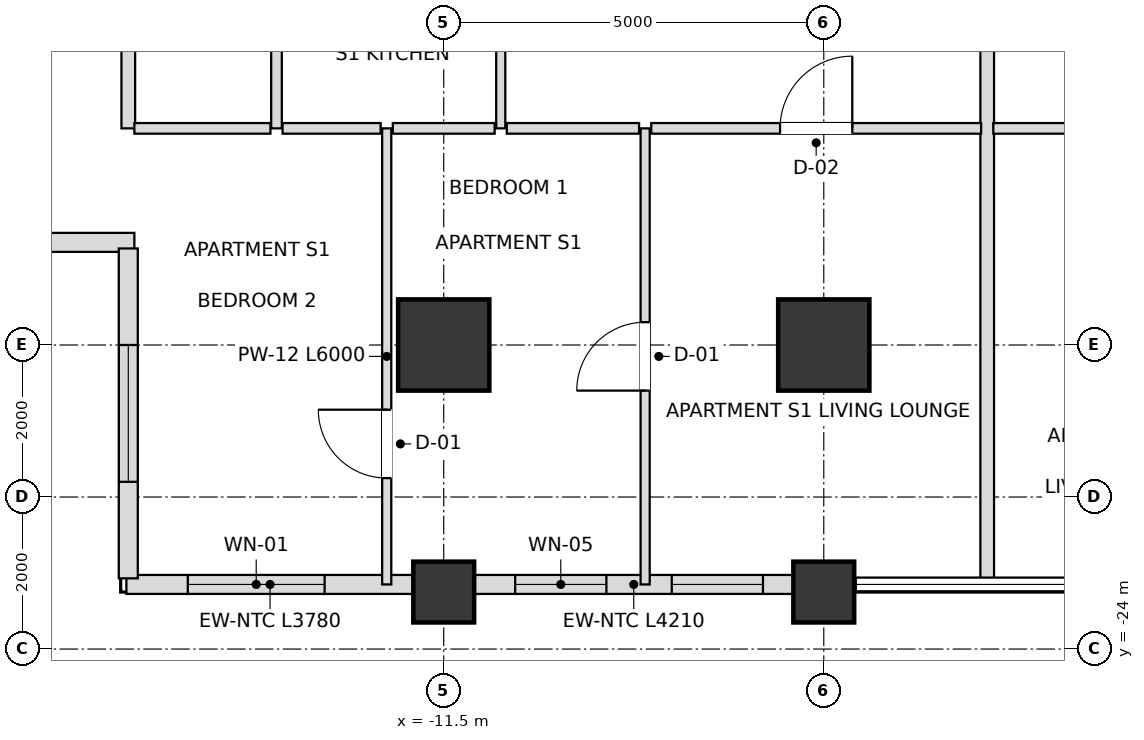
"""IFC4 building model, lengths in metres.
Left out: names, types, materials, properties, quantities, classifications, styles, units other than length and angle.
Written with IfcOpenShell. Run it as: python <this file> out.ifc"""

import sys

from ifc_helpers import new_model, si_unit, direction, frame, frame_2d, origin, origin_2d, place, context, subcontext, project, spatial, rectangle, extrude, element, fill, save


model = new_model("IFC4")
c1 = context("Model", 3, precision=1e-05, world=origin(), true_north=direction((0.0, 1.0)))
c2 = subcontext(c1, "Body", "Model", "MODEL_VIEW")
j1 = project(units=[si_unit("LENGTHUNIT", "METRE"), si_unit("PLANEANGLEUNIT", "RADIAN")], contexts=[c1])
p1 = place(None, origin())
s1 = spatial("IfcSite", under=j1, at=p1, CompositionType="ELEMENT")
p2 = place(p1, origin())
s2 = spatial("IfcBuilding", under=s1, at=p2, CompositionType="ELEMENT")
p3 = place(p2, frame((0.0, 0.0, 102.6)))
s3 = spatial("IfcBuildingStorey", under=s2, at=p3, CompositionType="ELEMENT", Elevation=102.6)
for number, where, z_axis, x_axis in (
    (1, (-11.5, -20.0, 0.0), (0.0, 0.0, 1.0), (1.0, 0.0, 0.0)),
    (2, (-6.5, -20.0, 0.0), (0.0, 0.0, 1.0), (1.0, 0.0, 0.0)),
):
    element("IfcColumn", number, at=place(p3, frame(where, z_axis=z_axis, x_axis=x_axis)), inside=s3, PredefinedType="USERDEFINED", context=c2, shape_type="SweptSolid", body=[
        extrude(rectangle(XDim=1.2, YDim=1.2, at=origin_2d()), origin(), (0.0, 0.0, 1.0), 3.6),
    ])
for number, where, z_axis, x_axis in (
    (3, (-11.5, -23.25, 0.0), (0.0, 0.0, 1.0), (1.0, 0.0, 0.0)),
    (4, (-6.5, -23.25, 0.0), (0.0, 0.0, 1.0), (1.0, 0.0, 0.0)),
):
    element("IfcColumn", number, at=place(p3, frame(where, z_axis=z_axis, x_axis=x_axis)), inside=s3, PredefinedType="COLUMN", context=c2, shape_type="SweptSolid", body=[
        extrude(rectangle(XDim=0.8, YDim=0.8, at=origin_2d()), origin(), (0.0, 0.0, 1.0), 3.6),
    ])
p4 = place(p3, frame((-15.675, -23.15, 0.0), z_axis=(0.0, 0.0, 1.0), x_axis=(1.0, 0.0, 0.0)))
e5 = element("IfcWall", 5, at=p4, inside=s3, PredefinedType="SOLIDWALL", context=c2, shape_type="SweptSolid", body=[
    extrude(rectangle(XDim=3.78, YDim=0.25, at=frame_2d((1.89, 0.0))), origin(), (0.0, 0.0, 1.0), 2.736),
])
p5 = place(p4, frame((0.808, 0.0, 0.72)))
e6 = element("IfcOpeningElement", 6, at=p5, cuts=e5, PredefinedType="OPENING", context=c2, shape_type="SweptSolid", body=[
    extrude(rectangle(XDim=1.8, YDim=1.68, at=frame_2d((0.9, 0.84))), frame((0.0, 0.135, 0.0), z_axis=(0.0, -1.0, 0.0), x_axis=(1.0, 0.0, 0.0)), (0.0, 0.0, 1.0), 0.27),
])
p6 = place(p3, frame((-11.105, -23.15, 0.0), z_axis=(0.0, 0.0, 1.0), x_axis=(1.0, 0.0, 0.0)))
e7 = element("IfcWall", 7, at=p6, inside=s3, PredefinedType="SOLIDWALL", context=c2, shape_type="SweptSolid", body=[
    extrude(rectangle(XDim=4.21, YDim=0.25, at=frame_2d((2.105, 0.0))), origin(), (0.0, 0.0, 1.0), 2.736),
])
p7 = place(p6, frame((0.545, 0.0, 0.72)))
e8 = element("IfcOpeningElement", 8, at=p7, cuts=e7, PredefinedType="OPENING", context=c2, shape_type="SweptSolid", body=[
    extrude(rectangle(XDim=1.2, YDim=1.68, at=frame_2d((0.6, 0.84))), frame((0.0, 0.135, 0.0), z_axis=(0.0, -1.0, 0.0), x_axis=(1.0, 0.0, 0.0)), (0.0, 0.0, 1.0), 0.27),
])
p8 = place(p6, frame((2.605, 0.0, 0.72)))
e9 = element("IfcOpeningElement", 9, at=p8, cuts=e7, PredefinedType="OPENING", context=c2, shape_type="SweptSolid", body=[
    extrude(rectangle(XDim=1.2, YDim=1.68, at=frame_2d((0.6, 0.84))), frame((0.0, 0.135, 0.0), z_axis=(0.0, -1.0, 0.0), x_axis=(1.0, 0.0, 0.0)), (0.0, 0.0, 1.0), 0.27),
])
p9 = place(p3, frame((-20.23, -18.65, 0.0), z_axis=(0.0, 0.0, 1.0), x_axis=(1.0, 0.0, 0.0)))
e10 = element("IfcWall", 10, at=p9, inside=s3, PredefinedType="SOLIDWALL", context=c2, shape_type="SweptSolid", body=[
    extrude(rectangle(XDim=4.66, YDim=0.25, at=frame_2d((2.33, 0.0))), origin(), (0.0, 0.0, 1.0), 2.736),
])
p10 = place(p9, frame((1.43, 0.0, 0.72)))
e11 = element("IfcOpeningElement", 11, at=p10, cuts=e10, PredefinedType="OPENING", context=c2, shape_type="SweptSolid", body=[
    extrude(rectangle(XDim=1.8, YDim=1.68, at=frame_2d((0.9, 0.84))), frame((0.0, 0.135, 0.0), z_axis=(0.0, -1.0, 0.0), x_axis=(1.0, 0.0, 0.0)), (0.0, 0.0, 1.0), 0.27),
])
p11 = place(p3, frame((-15.65, -18.73, 0.0), z_axis=(0.0, 0.0, 1.0), x_axis=(0.0, -1.0, 0.0)))
e12 = element("IfcWall", 12, at=p11, inside=s3, PredefinedType="SOLIDWALL", context=c2, shape_type="SweptSolid", body=[
    extrude(rectangle(XDim=4.34, YDim=0.25, at=frame_2d((2.17, 0.0))), origin(), (0.0, 0.0, 1.0), 2.736),
])
p12 = place(p11, frame((1.27, 0.0, 0.72)))
e13 = element("IfcOpeningElement", 13, at=p12, cuts=e12, PredefinedType="OPENING", context=c2, shape_type="SweptSolid", body=[
    extrude(rectangle(XDim=1.8, YDim=1.68, at=frame_2d((0.9, 0.84))), frame((0.0, 0.135, 0.0), z_axis=(0.0, -1.0, 0.0), x_axis=(1.0, 0.0, 0.0)), (0.0, 0.0, 1.0), 0.27),
])
p13 = place(p3, frame((-15.65, -17.15, 0.0), z_axis=(0.0, 0.0, 1.0), x_axis=(0.0, 1.0, 0.0)))
e14 = element("IfcWall", 14, at=p13, inside=s3, PredefinedType="PARTITIONING", context=c2, shape_type="SweptSolid", body=[
    extrude(rectangle(XDim=7.85, YDim=0.18, at=frame_2d((3.925, 0.0))), origin(), (0.0, 0.0, 1.0), 2.736),
])
p14 = place(p3, frame((-13.7, -17.15, 0.0), z_axis=(0.0, 0.0, 1.0), x_axis=(0.0, 1.0, 0.0)))
e15 = element("IfcWall", 15, at=p14, inside=s3, PredefinedType="PARTITIONING", context=c2, shape_type="SweptSolid", body=[
    extrude(rectangle(XDim=7.85, YDim=0.14, at=frame_2d((3.925, 0.0))), origin(), (0.0, 0.0, 1.0), 2.736),
])
p15 = place(p14, frame((3.48, 0.0, 0.0)))
e16 = element("IfcOpeningElement", 16, at=p15, cuts=e15, PredefinedType="OPENING", context=c2, shape_type="SweptSolid", body=[
    extrude(rectangle(XDim=0.9, YDim=2.1, at=frame_2d((0.45, 1.05))), frame((0.0, 0.08, 0.0), z_axis=(0.0, -1.0, 0.0), x_axis=(1.0, 0.0, 0.0)), (0.0, 0.0, 1.0), 0.16),
])
p16 = place(p3, frame((-12.25, -23.15, 0.0), z_axis=(0.0, 0.0, 1.0), x_axis=(0.0, 1.0, 0.0)))
e17 = element("IfcWall", 17, at=p16, inside=s3, PredefinedType="PARTITIONING", context=c2, shape_type="SweptSolid", body=[
    extrude(rectangle(XDim=6.0, YDim=0.12, at=frame_2d((3.0, 0.0))), origin(), (0.0, 0.0, 1.0), 2.736),
])
p17 = place(p16, frame((1.399, 0.0, 0.0)))
e18 = element("IfcOpeningElement", 18, at=p17, cuts=e17, PredefinedType="OPENING", context=c2, shape_type="SweptSolid", body=[
    extrude(rectangle(XDim=0.9, YDim=2.1, at=frame_2d((0.45, 1.05))), frame((0.0, 0.07, 0.0), z_axis=(0.0, -1.0, 0.0), x_axis=(1.0, 0.0, 0.0)), (0.0, 0.0, 1.0), 0.14),
])
p18 = place(p3, frame((-10.75, -17.15, 0.0), z_axis=(0.0, 0.0, 1.0), x_axis=(0.0, 1.0, 0.0)))
e19 = element("IfcWall", 19, at=p18, inside=s3, PredefinedType="PARTITIONING", context=c2, shape_type="SweptSolid", body=[
    extrude(rectangle(XDim=7.85, YDim=0.12, at=frame_2d((3.925, 0.0))), origin(), (0.0, 0.0, 1.0), 2.816),
])
p19 = place(p18, frame((2.681, 0.0, 0.0)))
e20 = element("IfcOpeningElement", 20, at=p19, cuts=e19, PredefinedType="OPENING", context=c2, shape_type="SweptSolid", body=[
    extrude(rectangle(XDim=0.95, YDim=2.1, at=frame_2d((0.475, 1.05))), frame((0.0, 0.07, 0.0), z_axis=(0.0, -1.0, 0.0), x_axis=(1.0, 0.0, 0.0)), (0.0, 0.0, 1.0), 0.14),
])
p20 = place(p3, frame((-8.85, -23.15, 0.0), z_axis=(0.0, 0.0, 1.0), x_axis=(0.0, 1.0, 0.0)))
e21 = element("IfcWall", 21, at=p20, inside=s3, PredefinedType="PARTITIONING", context=c2, shape_type="SweptSolid", body=[
    extrude(rectangle(XDim=6.0, YDim=0.12, at=frame_2d((3.0, 0.0))), origin(), (0.0, 0.0, 1.0), 2.816),
])
p21 = place(p20, frame((2.55, 0.0, 0.0)))
e22 = element("IfcOpeningElement", 22, at=p21, cuts=e21, PredefinedType="OPENING", context=c2, shape_type="SweptSolid", body=[
    extrude(rectangle(XDim=0.9, YDim=2.1, at=frame_2d((0.45, 1.05))), frame((0.0, 0.07, 0.0), z_axis=(0.0, -1.0, 0.0), x_axis=(1.0, 0.0, 0.0)), (0.0, 0.0, 1.0), 0.14),
])
p22 = place(p3, frame((-4.35, -23.15, 0.0), z_axis=(0.0, 0.0, 1.0), x_axis=(0.0, 1.0, 0.0)))
e23 = element("IfcWall", 23, at=p22, inside=s3, PredefinedType="PARTITIONING", context=c2, shape_type="SweptSolid", body=[
    extrude(rectangle(XDim=13.85, YDim=0.18, at=frame_2d((6.925, 0.0))), origin(), (0.0, 0.0, 1.0), 2.816),
])
p23 = place(p3, frame((-15.57, -17.15, 0.0), z_axis=(0.0, 0.0, 1.0), x_axis=(1.0, 0.0, 0.0)))
e24 = element("IfcWall", 24, at=p23, inside=s3, PredefinedType="PARTITIONING", context=c2, shape_type="SweptSolid", body=[
    extrude(rectangle(XDim=1.79, YDim=0.14, at=frame_2d((0.895, 0.0))), origin(), (0.0, 0.0, 1.0), 2.736),
])
p24 = place(p3, frame((-13.62, -17.15, 0.0), z_axis=(0.0, 0.0, 1.0), x_axis=(1.0, 0.0, 0.0)))
e25 = element("IfcWall", 25, at=p24, inside=s3, PredefinedType="PARTITIONING", context=c2, shape_type="SweptSolid", body=[
    extrude(rectangle(XDim=1.29, YDim=0.14, at=frame_2d((0.645, 0.0))), origin(), (0.0, 0.0, 1.0), 2.736),
])
p25 = place(p3, frame((-12.17, -17.15, 0.0), z_axis=(0.0, 0.0, 1.0), x_axis=(1.0, 0.0, 0.0)))
e26 = element("IfcWall", 26, at=p25, inside=s3, PredefinedType="PARTITIONING", context=c2, shape_type="SweptSolid", body=[
    extrude(rectangle(XDim=1.34, YDim=0.14, at=frame_2d((0.67, 0.0))), origin(), (0.0, 0.0, 1.0), 2.736),
])
p26 = place(p3, frame((-10.67, -17.15, 0.0), z_axis=(0.0, 0.0, 1.0), x_axis=(1.0, 0.0, 0.0)))
e27 = element("IfcWall", 27, at=p26, inside=s3, PredefinedType="PARTITIONING", context=c2, shape_type="SweptSolid", body=[
    extrude(rectangle(XDim=1.74, YDim=0.14, at=frame_2d((0.87, 0.0))), origin(), (0.0, 0.0, 1.0), 3.38),
])
p27 = place(p3, frame((-8.77, -17.15, 0.0), z_axis=(0.0, 0.0, 1.0), x_axis=(1.0, 0.0, 0.0)))
e28 = element("IfcWall", 28, at=p27, inside=s3, PredefinedType="PARTITIONING", context=c2, shape_type="SweptSolid", body=[
    extrude(rectangle(XDim=4.34, YDim=0.14, at=frame_2d((2.17, 0.0))), origin(), (0.0, 0.0, 1.0), 2.816),
])
p28 = place(p27, frame((1.695, 0.0, 0.0)))
e29 = element("IfcOpeningElement", 29, at=p28, cuts=e28, PredefinedType="OPENING", context=c2, shape_type="SweptSolid", body=[
    extrude(rectangle(XDim=0.95, YDim=2.1, at=frame_2d((0.475, 1.05))), frame((0.0, 0.08, 0.0), z_axis=(0.0, -1.0, 0.0), x_axis=(1.0, 0.0, 0.0)), (0.0, 0.0, 1.0), 0.16),
])
p29 = place(p3, frame((-4.27, -17.15, 0.0), z_axis=(0.0, 0.0, 1.0), x_axis=(1.0, 0.0, 0.0)))
e30 = element("IfcWall", 30, at=p29, inside=s3, PredefinedType="PARTITIONING", context=c2, shape_type="SweptSolid", body=[
    extrude(rectangle(XDim=1.64, YDim=0.14, at=frame_2d((0.82, 0.0))), origin(), (0.0, 0.0, 1.0), 3.38),
])
p30 = place(p5, origin())
e31 = element("IfcWindow", 31, at=p30, inside=s3, PartitioningType="SINGLE_PANEL", PredefinedType="WINDOW", context=c2, shape_type="SweptSolid", body=[
    extrude(rectangle(XDim=1.8, YDim=1.68, at=frame_2d((0.9, 0.84))), frame((0.0, 0.03, 0.0), z_axis=(0.0, -1.0, 0.0), x_axis=(1.0, 0.0, 0.0)), (0.0, 0.0, 1.0), 0.06),
])
fill(e6, e31)
p31 = place(p7, origin())
e32 = element("IfcWindow", 32, at=p31, inside=s3, PartitioningType="SINGLE_PANEL", PredefinedType="WINDOW", context=c2, shape_type="SweptSolid", body=[
    extrude(rectangle(XDim=1.2, YDim=1.68, at=frame_2d((0.6, 0.84))), frame((0.0, 0.03, 0.0), z_axis=(0.0, -1.0, 0.0), x_axis=(1.0, 0.0, 0.0)), (0.0, 0.0, 1.0), 0.06),
])
fill(e8, e32)
p32 = place(p8, origin())
e33 = element("IfcWindow", 33, at=p32, inside=s3, PartitioningType="SINGLE_PANEL", PredefinedType="WINDOW", context=c2, shape_type="SweptSolid", body=[
    extrude(rectangle(XDim=1.2, YDim=1.68, at=frame_2d((0.6, 0.84))), frame((0.0, 0.03, 0.0), z_axis=(0.0, -1.0, 0.0), x_axis=(1.0, 0.0, 0.0)), (0.0, 0.0, 1.0), 0.06),
])
fill(e9, e33)
p33 = place(p12, origin())
e34 = element("IfcWindow", 34, at=p33, inside=s3, PartitioningType="SINGLE_PANEL", PredefinedType="WINDOW", context=c2, shape_type="SweptSolid", body=[
    extrude(rectangle(XDim=1.8, YDim=1.68, at=frame_2d((0.9, 0.84))), frame((0.0, 0.03, 0.0), z_axis=(0.0, -1.0, 0.0), x_axis=(1.0, 0.0, 0.0)), (0.0, 0.0, 1.0), 0.06),
])
fill(e13, e34)
p34 = place(p28, origin())
e35 = element("IfcDoor", 35, at=p34, inside=s3, OperationType="SINGLE_SWING_RIGHT", PredefinedType="DOOR", context=c2, shape_type="SweptSolid", body=[
    extrude(rectangle(XDim=0.95, YDim=2.1, at=frame_2d((0.475, 1.05))), frame((0.0, 0.025, 0.0), z_axis=(0.0, -1.0, 0.0), x_axis=(1.0, 0.0, 0.0)), (0.0, 0.0, 1.0), 0.05),
])
fill(e29, e35)
p35 = place(p21, origin())
e36 = element("IfcDoor", 36, at=p35, inside=s3, OperationType="SINGLE_SWING_LEFT", PredefinedType="DOOR", context=c2, shape_type="SweptSolid", body=[
    extrude(rectangle(XDim=0.9, YDim=2.1, at=frame_2d((0.45, 1.05))), frame((0.0, 0.025, 0.0), z_axis=(0.0, -1.0, 0.0), x_axis=(1.0, 0.0, 0.0)), (0.0, 0.0, 1.0), 0.05),
])
fill(e22, e36)
p36 = place(p17, origin())
e37 = element("IfcDoor", 37, at=p36, inside=s3, OperationType="SINGLE_SWING_RIGHT", PredefinedType="DOOR", context=c2, shape_type="SweptSolid", body=[
    extrude(rectangle(XDim=0.9, YDim=2.1, at=frame_2d((0.45, 1.05))), frame((0.0, 0.025, 0.0), z_axis=(0.0, -1.0, 0.0), x_axis=(1.0, 0.0, 0.0)), (0.0, 0.0, 1.0), 0.05),
])
fill(e18, e37)
save(model, sys.argv[1])
